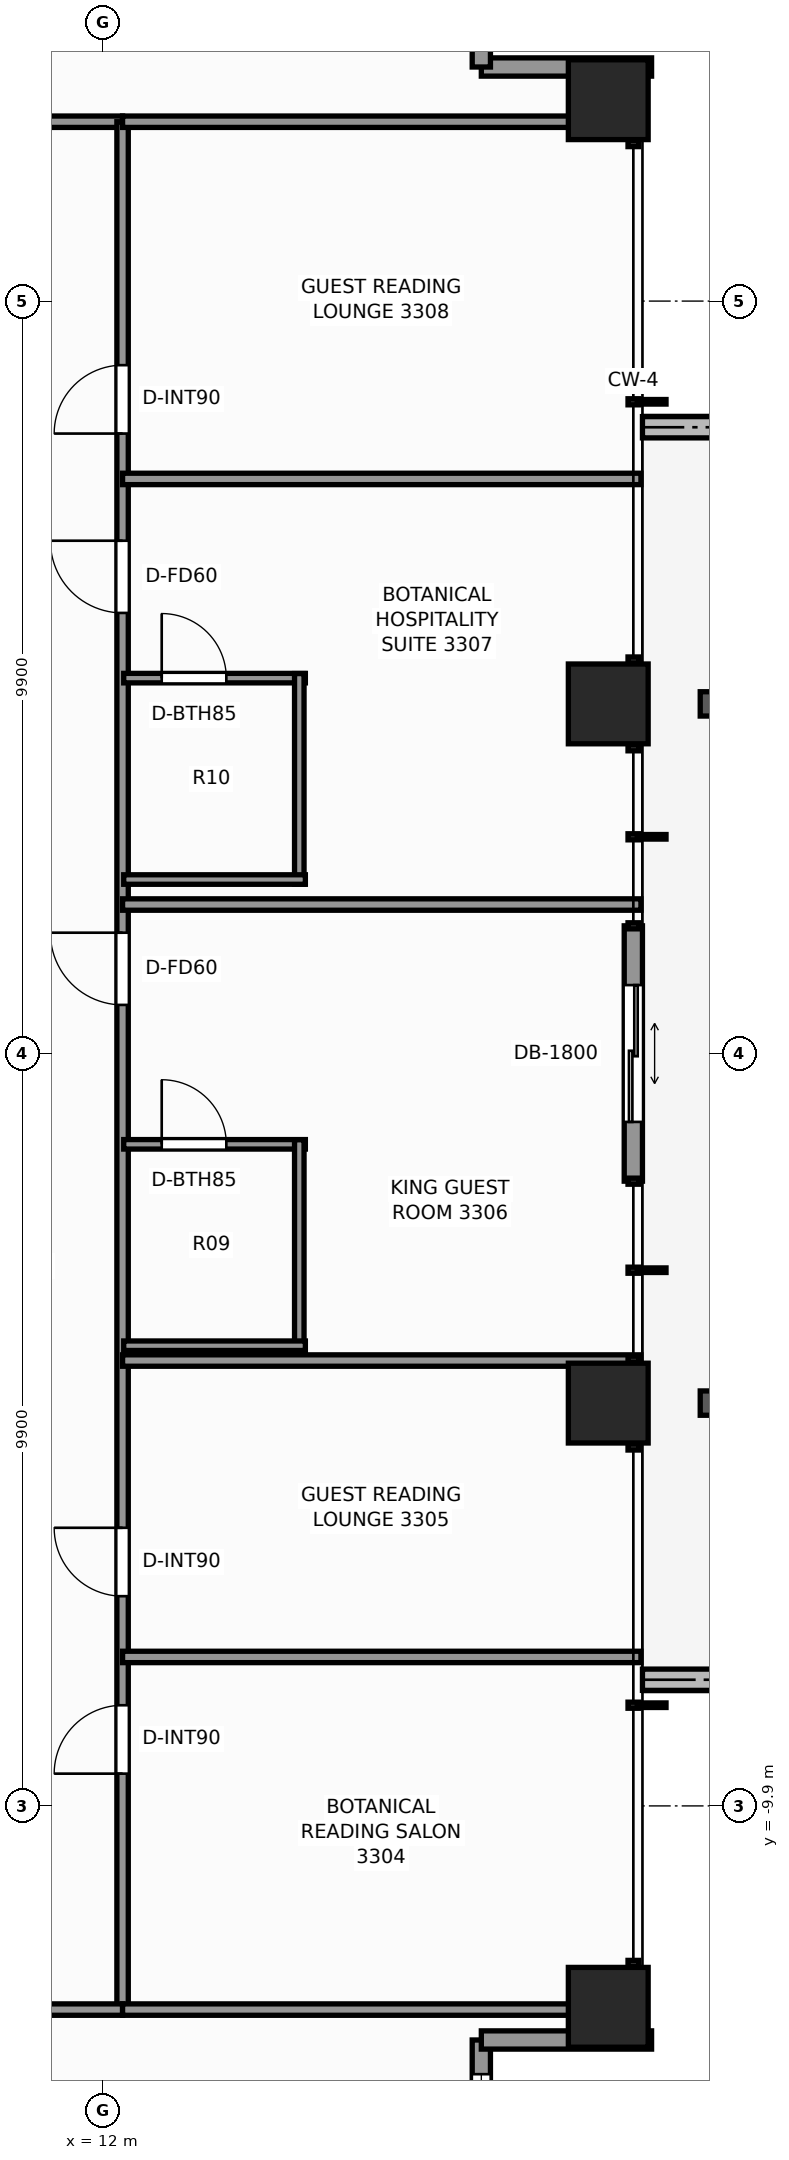
"""IFC4 building model, lengths in metres.
Left out: names, types, materials, properties, quantities, classifications, styles, units other than length and angle.
Written with IfcOpenShell. Run it as: python <this file> out.ifc"""

import sys

from ifc_helpers import new_model, si_unit, direction, frame, frame_2d, origin, origin_2d, place, context, subcontext, project, spatial, rectangle, extrude, element, fill, save


model = new_model("IFC4")
c1 = context("Model", 3, precision=1e-05, world=origin(), true_north=direction((0.0, 1.0)))
c2 = subcontext(c1, "Body", "Model", "MODEL_VIEW")
j1 = project(units=[si_unit("LENGTHUNIT", "METRE"), si_unit("PLANEANGLEUNIT", "RADIAN")], contexts=[c1])
p1 = place(None, origin())
s1 = spatial("IfcSite", under=j1, at=p1, CompositionType="ELEMENT")
p2 = place(p1, origin())
s2 = spatial("IfcBuilding", under=s1, at=p2, CompositionType="ELEMENT")
p3 = place(p2, frame((0.0, 0.0, 115.1)))
s3 = spatial("IfcBuildingStorey", under=s2, at=p3, CompositionType="ELEMENT", Elevation=115.1)
for number, where, z_axis, x_axis in (
    (1, (18.65, -12.55, 0.0), (0.0, 0.0, 1.0), (1.0, 0.0, 0.0)),
    (2, (18.65, -4.6, 0.0), (0.0, 0.0, 1.0), (1.0, 0.0, 0.0)),
    (3, (18.65, 4.6, 0.0), (0.0, 0.0, 1.0), (1.0, 0.0, 0.0)),
    (4, (18.65, 12.55, 0.0), (0.0, 0.0, 1.0), (1.0, 0.0, 0.0)),
):
    element("IfcColumn", number, at=place(p3, frame(where, z_axis=z_axis, x_axis=x_axis)), inside=s3, PredefinedType="COLUMN", context=c2, shape_type="SweptSolid", body=[
        extrude(rectangle(XDim=1.05, YDim=1.05, at=origin_2d()), origin(), (0.0, 0.0, 1.0), 3.3),
    ])
p4 = place(p3, frame((20.805, 8.24, -0.04), z_axis=(0.0, 0.0, 1.0), x_axis=(-1.0, 0.0, 0.0)))
e5 = element("IfcWall", 5, at=p4, inside=s3, PredefinedType="PARAPET", context=c2, shape_type="SweptSolid", body=[
    extrude(rectangle(XDim=1.705, YDim=0.28, at=frame_2d((0.853, 0.0))), origin(), (0.0, 0.0, 1.0), 0.42),
])
p5 = place(p3, frame((19.1, -8.24, -0.04), z_axis=(0.0, 0.0, 1.0), x_axis=(1.0, 0.0, 0.0)))
e6 = element("IfcWall", 6, at=p5, inside=s3, PredefinedType="PARAPET", context=c2, shape_type="SweptSolid", body=[
    extrude(rectangle(XDim=2.975, YDim=0.28, at=frame_2d((1.487, 0.0))), origin(), (0.0, 0.0, 1.0), 0.42),
])
p6 = place(p3, frame((16.98, -12.98, 0.0), z_axis=(0.0, 0.0, 1.0), x_axis=(0.0, -1.0, 0.0)))
e7 = element("IfcWall", 7, at=p6, inside=s3, PredefinedType="STANDARD", context=c2, shape_type="SweptSolid", body=[
    extrude(rectangle(XDim=2.24, YDim=0.24, at=frame_2d((1.12, 0.0))), origin(), (0.0, 0.0, 1.0), 2.459),
])
p7 = place(p6, frame((0.45, 0.0, 0.65)))
e8 = element("IfcOpeningElement", 8, at=p7, cuts=e7, PredefinedType="OPENING", context=c2, shape_type="SweptSolid", body=[
    extrude(rectangle(XDim=1.1, YDim=1.45, at=frame_2d((0.55, 0.725))), frame((0.0, 0.13, 0.0), z_axis=(0.0, -1.0, 0.0), x_axis=(1.0, 0.0, 0.0)), (0.0, 0.0, 1.0), 0.26),
])
p8 = place(p3, frame((19.22, -12.98, 0.0), z_axis=(0.0, 0.0, 1.0), x_axis=(-1.0, 0.0, 0.0)))
e9 = element("IfcWall", 9, at=p8, inside=s3, PredefinedType="STANDARD", context=c2, shape_type="SweptSolid", body=[
    extrude(rectangle(XDim=2.24, YDim=0.24, at=frame_2d((1.12, 0.0))), origin(), (0.0, 0.0, 1.0), 2.459),
])
p9 = place(p3, frame((18.98, 1.68, 0.0), z_axis=(0.0, 0.0, 1.0), x_axis=(0.0, -1.0, 0.0)))
e10 = element("IfcWall", 10, at=p9, inside=s3, PredefinedType="STANDARD", context=c2, shape_type="SweptSolid", body=[
    extrude(rectangle(XDim=3.36, YDim=0.24, at=frame_2d((1.68, 0.0))), origin(), (0.0, 0.0, 1.0), 3.08),
])
p10 = place(p9, frame((0.78, 0.0, 0.0)))
e11 = element("IfcOpeningElement", 11, at=p10, cuts=e10, PredefinedType="OPENING", context=c2, shape_type="SweptSolid", body=[
    extrude(rectangle(XDim=1.8, YDim=2.2, at=frame_2d((0.9, 1.1))), frame((0.0, 0.13, 0.0), z_axis=(0.0, -1.0, 0.0), x_axis=(1.0, 0.0, 0.0)), (0.0, 0.0, 1.0), 0.26),
])
p11 = place(p3, frame((16.98, 12.98, 0.0), z_axis=(0.0, 0.0, 1.0), x_axis=(1.0, 0.0, 0.0)))
e12 = element("IfcWall", 12, at=p11, inside=s3, PredefinedType="STANDARD", context=c2, shape_type="SweptSolid", body=[
    extrude(rectangle(XDim=2.24, YDim=0.24, at=frame_2d((1.12, 0.0))), origin(), (0.0, 0.0, 1.0), 2.459),
])
p12 = place(p3, frame((16.98, 15.22, 0.0), z_axis=(0.0, 0.0, 1.0), x_axis=(0.0, -1.0, 0.0)))
e13 = element("IfcWall", 13, at=p12, inside=s3, PredefinedType="STANDARD", context=c2, shape_type="SweptSolid", body=[
    extrude(rectangle(XDim=2.24, YDim=0.24, at=frame_2d((1.12, 0.0))), origin(), (0.0, 0.0, 1.0), 2.459),
])
p13 = place(p12, frame((0.45, 0.0, 0.65)))
e14 = element("IfcOpeningElement", 14, at=p13, cuts=e13, PredefinedType="OPENING", context=c2, shape_type="SweptSolid", body=[
    extrude(rectangle(XDim=1.1, YDim=1.45, at=frame_2d((0.55, 0.725))), frame((0.0, 0.13, 0.0), z_axis=(0.0, -1.0, 0.0), x_axis=(1.0, 0.0, 0.0)), (0.0, 0.0, 1.0), 0.26),
])
p14 = place(p3, frame((-12.42, 12.26, 0.0), z_axis=(0.0, 0.0, 1.0), x_axis=(1.0, 0.0, 0.0)))
e15 = element("IfcWall", 15, at=p14, inside=s3, PredefinedType="PARTITIONING", context=c2, shape_type="SweptSolid", body=[
    extrude(rectangle(XDim=24.68, YDim=0.15, at=frame_2d((12.34, 0.0))), origin(), (0.0, 0.0, 1.0), 2.292),
])
p15 = place(p14, frame((4.435, 0.0, 0.0)))
e16 = element("IfcOpeningElement", 16, at=p15, cuts=e15, PredefinedType="OPENING", context=c2, shape_type="SweptSolid", body=[
    extrude(rectangle(XDim=0.9, YDim=2.06, at=frame_2d((0.45, 1.03))), frame((0.0, 0.085, 0.0), z_axis=(0.0, -1.0, 0.0), x_axis=(1.0, 0.0, 0.0)), (0.0, 0.0, 1.0), 0.17),
])
p16 = place(p14, frame((9.718, 0.0, 0.0)))
e17 = element("IfcOpeningElement", 17, at=p16, cuts=e15, PredefinedType="OPENING", context=c2, shape_type="SweptSolid", body=[
    extrude(rectangle(XDim=0.9, YDim=2.06, at=frame_2d((0.45, 1.03))), frame((0.0, 0.085, 0.0), z_axis=(0.0, -1.0, 0.0), x_axis=(1.0, 0.0, 0.0)), (0.0, 0.0, 1.0), 0.17),
])
p17 = place(p14, frame((13.516, 0.0, 0.0)))
e18 = element("IfcOpeningElement", 18, at=p17, cuts=e15, PredefinedType="OPENING", context=c2, shape_type="SweptSolid", body=[
    extrude(rectangle(XDim=0.95, YDim=2.06, at=frame_2d((0.475, 1.03))), frame((0.0, 0.085, 0.0), z_axis=(0.0, -1.0, 0.0), x_axis=(1.0, 0.0, 0.0)), (0.0, 0.0, 1.0), 0.17),
])
p18 = place(p14, frame((18.772, 0.0, 0.0)))
e19 = element("IfcOpeningElement", 19, at=p18, cuts=e15, PredefinedType="OPENING", context=c2, shape_type="SweptSolid", body=[
    extrude(rectangle(XDim=0.9, YDim=2.06, at=frame_2d((0.45, 1.03))), frame((0.0, 0.085, 0.0), z_axis=(0.0, -1.0, 0.0), x_axis=(1.0, 0.0, 0.0)), (0.0, 0.0, 1.0), 0.17),
])
p19 = place(p14, frame((21.107, 0.0, 0.0)))
e20 = element("IfcOpeningElement", 20, at=p19, cuts=e15, PredefinedType="OPENING", context=c2, shape_type="SweptSolid", body=[
    extrude(rectangle(XDim=0.9, YDim=2.06, at=frame_2d((0.45, 1.03))), frame((0.0, 0.085, 0.0), z_axis=(0.0, -1.0, 0.0), x_axis=(1.0, 0.0, 0.0)), (0.0, 0.0, 1.0), 0.17),
])
p20 = place(p3, frame((12.26, -12.58, 0.0), z_axis=(0.0, 0.0, 1.0), x_axis=(0.0, 1.0, 0.0)))
e21 = element("IfcWall", 21, at=p20, inside=s3, PredefinedType="PARTITIONING", context=c2, shape_type="SweptSolid", body=[
    extrude(rectangle(XDim=24.84, YDim=0.15, at=frame_2d((12.42, 0.0))), origin(), (0.0, 0.0, 1.0), 2.292),
])
p21 = place(p20, frame((3.104, 0.0, 0.0)))
e22 = element("IfcOpeningElement", 22, at=p21, cuts=e21, PredefinedType="OPENING", context=c2, shape_type="SweptSolid", body=[
    extrude(rectangle(XDim=0.9, YDim=2.06, at=frame_2d((0.45, 1.03))), frame((0.0, 0.085, 0.0), z_axis=(0.0, -1.0, 0.0), x_axis=(1.0, 0.0, 0.0)), (0.0, 0.0, 1.0), 0.17),
])
p22 = place(p20, frame((5.439, 0.0, 0.0)))
e23 = element("IfcOpeningElement", 23, at=p22, cuts=e21, PredefinedType="OPENING", context=c2, shape_type="SweptSolid", body=[
    extrude(rectangle(XDim=0.9, YDim=2.06, at=frame_2d((0.45, 1.03))), frame((0.0, 0.085, 0.0), z_axis=(0.0, -1.0, 0.0), x_axis=(1.0, 0.0, 0.0)), (0.0, 0.0, 1.0), 0.17),
])
p23 = place(p20, frame((13.219, 0.0, 0.0)))
e24 = element("IfcOpeningElement", 24, at=p23, cuts=e21, PredefinedType="OPENING", context=c2, shape_type="SweptSolid", body=[
    extrude(rectangle(XDim=0.95, YDim=2.06, at=frame_2d((0.475, 1.03))), frame((0.0, 0.085, 0.0), z_axis=(0.0, -1.0, 0.0), x_axis=(1.0, 0.0, 0.0)), (0.0, 0.0, 1.0), 0.17),
])
p24 = place(p20, frame((18.377, 0.0, 0.0)))
e25 = element("IfcOpeningElement", 25, at=p24, cuts=e21, PredefinedType="OPENING", context=c2, shape_type="SweptSolid", body=[
    extrude(rectangle(XDim=0.95, YDim=2.06, at=frame_2d((0.475, 1.03))), frame((0.0, 0.085, 0.0), z_axis=(0.0, -1.0, 0.0), x_axis=(1.0, 0.0, 0.0)), (0.0, 0.0, 1.0), 0.17),
])
p25 = place(p20, frame((20.737, 0.0, 0.0)))
e26 = element("IfcOpeningElement", 26, at=p25, cuts=e21, PredefinedType="OPENING", context=c2, shape_type="SweptSolid", body=[
    extrude(rectangle(XDim=0.9, YDim=2.06, at=frame_2d((0.45, 1.03))), frame((0.0, 0.085, 0.0), z_axis=(0.0, -1.0, 0.0), x_axis=(1.0, 0.0, 0.0)), (0.0, 0.0, 1.0), 0.17),
])
p26 = place(p3, frame((-3.65, -12.58, 0.0), z_axis=(0.0, 0.0, 1.0), x_axis=(1.0, 0.0, 0.0)))
e27 = element("IfcWall", 27, at=p26, inside=s3, PredefinedType="PARTITIONING", context=c2, shape_type="SweptSolid", body=[
    extrude(rectangle(XDim=15.91, YDim=0.15, at=frame_2d((7.955, 0.0))), origin(), (0.0, 0.0, 1.0), 2.292),
])
p27 = place(p26, frame((5.109, 0.0, 0.0)))
e28 = element("IfcOpeningElement", 28, at=p27, cuts=e27, PredefinedType="OPENING", context=c2, shape_type="SweptSolid", body=[
    extrude(rectangle(XDim=0.95, YDim=2.06, at=frame_2d((0.475, 1.03))), frame((0.0, 0.085, 0.0), z_axis=(0.0, -1.0, 0.0), x_axis=(1.0, 0.0, 0.0)), (0.0, 0.0, 1.0), 0.17),
])
p28 = place(p26, frame((9.858, 0.0, 0.0)))
e29 = element("IfcOpeningElement", 29, at=p28, cuts=e27, PredefinedType="OPENING", context=c2, shape_type="SweptSolid", body=[
    extrude(rectangle(XDim=0.9, YDim=2.06, at=frame_2d((0.45, 1.03))), frame((0.0, 0.085, 0.0), z_axis=(0.0, -1.0, 0.0), x_axis=(1.0, 0.0, 0.0)), (0.0, 0.0, 1.0), 0.17),
])
p29 = place(p26, frame((12.028, 0.0, 0.0)))
e30 = element("IfcOpeningElement", 30, at=p29, cuts=e27, PredefinedType="OPENING", context=c2, shape_type="SweptSolid", body=[
    extrude(rectangle(XDim=0.9, YDim=2.06, at=frame_2d((0.45, 1.03))), frame((0.0, 0.085, 0.0), z_axis=(0.0, -1.0, 0.0), x_axis=(1.0, 0.0, 0.0)), (0.0, 0.0, 1.0), 0.17),
])
for number, where, z_axis, x_axis in (
    (31, (12.26, -12.58, 0.0), (0.0, 0.0, 1.0), (1.0, 0.0, 0.0)),
    (32, (12.26, 12.26, 0.0), (0.0, 0.0, 1.0), (1.0, 0.0, 0.0)),
):
    element("IfcWall", number, at=place(p3, frame(where, z_axis=z_axis, x_axis=x_axis)), inside=s3, PredefinedType="PARTITIONING", context=c2, shape_type="SweptSolid", body=[
        extrude(rectangle(XDim=6.82, YDim=0.15, at=frame_2d((3.41, 0.0))), origin(), (0.0, 0.0, 1.0), 2.292),
    ])
for number, where, z_axis, x_axis in (
    (33, (12.26, -7.94, 0.0), (0.0, 0.0, 1.0), (1.0, 0.0, 0.0)),
    (34, (12.26, -4.04, 0.0), (0.0, 0.0, 1.0), (1.0, 0.0, 0.0)),
    (35, (12.26, 1.96, 0.0), (0.0, 0.0, 1.0), (1.0, 0.0, 0.0)),
):
    element("IfcWall", number, at=place(p3, frame(where, z_axis=z_axis, x_axis=x_axis)), inside=s3, PredefinedType="PARTITIONING", context=c2, shape_type="SweptSolid", body=[
        extrude(rectangle(XDim=6.82, YDim=0.15, at=frame_2d((3.41, 0.0))), origin(), (0.0, 0.0, 1.0), 2.449),
    ])
p30 = place(p3, frame((12.275, -1.195, 0.0), z_axis=(0.0, 0.0, 1.0), x_axis=(1.0, 0.0, 0.0)))
e36 = element("IfcWall", 36, at=p30, inside=s3, PredefinedType="PARTITIONING", context=c2, shape_type="SweptSolid", body=[
    extrude(rectangle(XDim=2.39, YDim=0.125, at=frame_2d((1.195, 0.0))), origin(), (0.0, 0.0, 1.0), 3.08),
])
p31 = place(p30, frame((0.5, 0.0, 0.0)))
e37 = element("IfcOpeningElement", 37, at=p31, cuts=e36, PredefinedType="OPENING", context=c2, shape_type="SweptSolid", body=[
    extrude(rectangle(XDim=0.85, YDim=2.03, at=frame_2d((0.425, 1.015))), frame((0.0, 0.073, 0.0), z_axis=(0.0, -1.0, 0.0), x_axis=(1.0, 0.0, 0.0)), (0.0, 0.0, 1.0), 0.145),
])
p32 = place(p3, frame((14.585, -3.905, 0.0), z_axis=(0.0, 0.0, 1.0), x_axis=(0.0, 1.0, 0.0)))
e38 = element("IfcWall", 38, at=p32, inside=s3, PredefinedType="PARTITIONING", context=c2, shape_type="SweptSolid", body=[
    extrude(rectangle(XDim=2.77, YDim=0.125, at=frame_2d((1.385, 0.0))), origin(), (0.0, 0.0, 1.0), 3.08),
])
p33 = place(p3, frame((12.275, -3.845, 0.0), z_axis=(0.0, 0.0, 1.0), x_axis=(1.0, 0.0, 0.0)))
e39 = element("IfcWall", 39, at=p33, inside=s3, PredefinedType="PARTITIONING", context=c2, shape_type="SweptSolid", body=[
    extrude(rectangle(XDim=2.39, YDim=0.125, at=frame_2d((1.195, 0.0))), origin(), (0.0, 0.0, 1.0), 3.08),
])
p34 = place(p3, frame((12.26, 7.56, 0.0), z_axis=(0.0, 0.0, 1.0), x_axis=(1.0, 0.0, 0.0)))
e40 = element("IfcWall", 40, at=p34, inside=s3, PredefinedType="PARTITIONING", context=c2, shape_type="SweptSolid", body=[
    extrude(rectangle(XDim=6.82, YDim=0.15, at=frame_2d((3.41, 0.0))), origin(), (0.0, 0.0, 1.0), 2.449),
])
p35 = place(p3, frame((12.275, 4.939, 0.0), z_axis=(0.0, 0.0, 1.0), x_axis=(1.0, 0.0, 0.0)))
e41 = element("IfcWall", 41, at=p35, inside=s3, PredefinedType="PARTITIONING", context=c2, shape_type="SweptSolid", body=[
    extrude(rectangle(XDim=2.39, YDim=0.125, at=frame_2d((1.195, 0.0))), origin(), (0.0, 0.0, 1.0), 3.08),
])
p36 = place(p35, frame((0.5, 0.0, 0.0)))
e42 = element("IfcOpeningElement", 42, at=p36, cuts=e41, PredefinedType="OPENING", context=c2, shape_type="SweptSolid", body=[
    extrude(rectangle(XDim=0.85, YDim=2.03, at=frame_2d((0.425, 1.015))), frame((0.0, 0.073, 0.0), z_axis=(0.0, -1.0, 0.0), x_axis=(1.0, 0.0, 0.0)), (0.0, 0.0, 1.0), 0.145),
])
p37 = place(p3, frame((14.585, 2.229, 0.0), z_axis=(0.0, 0.0, 1.0), x_axis=(0.0, 1.0, 0.0)))
e43 = element("IfcWall", 43, at=p37, inside=s3, PredefinedType="PARTITIONING", context=c2, shape_type="SweptSolid", body=[
    extrude(rectangle(XDim=2.77, YDim=0.125, at=frame_2d((1.385, 0.0))), origin(), (0.0, 0.0, 1.0), 2.292),
])
p38 = place(p3, frame((12.275, 2.289, 0.0), z_axis=(0.0, 0.0, 1.0), x_axis=(1.0, 0.0, 0.0)))
e44 = element("IfcWall", 44, at=p38, inside=s3, PredefinedType="PARTITIONING", context=c2, shape_type="SweptSolid", body=[
    extrude(rectangle(XDim=2.39, YDim=0.125, at=frame_2d((1.195, 0.0))), origin(), (0.0, 0.0, 1.0), 3.08),
])
p39 = place(p7, origin())
e45 = element("IfcWindow", 45, at=p39, inside=s3, PartitioningType="SINGLE_PANEL", PredefinedType="WINDOW", context=c2, shape_type="SweptSolid", body=[
    extrude(rectangle(XDim=1.1, YDim=1.45, at=frame_2d((0.55, 0.725))), frame((0.0, 0.03, 0.0), z_axis=(0.0, -1.0, 0.0), x_axis=(1.0, 0.0, 0.0)), (0.0, 0.0, 1.0), 0.06),
])
fill(e8, e45)
p40 = place(p10, origin())
e46 = element("IfcDoor", 46, at=p40, inside=s3, OperationType="DOUBLE_DOOR_SLIDING", PredefinedType="DOOR", context=c2, shape_type="SweptSolid", body=[
    extrude(rectangle(XDim=1.8, YDim=2.2, at=frame_2d((0.9, 1.1))), frame((0.0, 0.025, 0.0), z_axis=(0.0, -1.0, 0.0), x_axis=(1.0, 0.0, 0.0)), (0.0, 0.0, 1.0), 0.05),
])
fill(e11, e46)
p41 = place(p21, origin())
e47 = element("IfcDoor", 47, at=p41, inside=s3, OperationType="SINGLE_SWING_LEFT", PredefinedType="DOOR", context=c2, shape_type="SweptSolid", body=[
    extrude(rectangle(XDim=0.9, YDim=2.06, at=frame_2d((0.45, 1.03))), frame((0.0, 0.025, 0.0), z_axis=(0.0, -1.0, 0.0), x_axis=(1.0, 0.0, 0.0)), (0.0, 0.0, 1.0), 0.05),
])
fill(e22, e47)
p42 = place(p22, origin())
e48 = element("IfcDoor", 48, at=p42, inside=s3, OperationType="SINGLE_SWING_RIGHT", PredefinedType="DOOR", context=c2, shape_type="SweptSolid", body=[
    extrude(rectangle(XDim=0.9, YDim=2.06, at=frame_2d((0.45, 1.03))), frame((0.0, 0.025, 0.0), z_axis=(0.0, -1.0, 0.0), x_axis=(1.0, 0.0, 0.0)), (0.0, 0.0, 1.0), 0.05),
])
fill(e23, e48)
p43 = place(p31, origin())
e49 = element("IfcDoor", 49, at=p43, inside=s3, OperationType="SINGLE_SWING_LEFT", PredefinedType="DOOR", context=c2, shape_type="SweptSolid", body=[
    extrude(rectangle(XDim=0.85, YDim=2.03, at=frame_2d((0.425, 1.015))), frame((0.0, 0.025, 0.0), z_axis=(0.0, -1.0, 0.0), x_axis=(1.0, 0.0, 0.0)), (0.0, 0.0, 1.0), 0.05),
])
fill(e37, e49)
p44 = place(p23, origin())
e50 = element("IfcDoor", 50, at=p44, inside=s3, OperationType="SINGLE_SWING_RIGHT", PredefinedType="DOOR", context=c2, shape_type="SweptSolid", body=[
    extrude(rectangle(XDim=0.95, YDim=2.06, at=frame_2d((0.475, 1.03))), frame((0.0, 0.025, 0.0), z_axis=(0.0, -1.0, 0.0), x_axis=(1.0, 0.0, 0.0)), (0.0, 0.0, 1.0), 0.05),
])
fill(e24, e50)
p45 = place(p36, origin())
e51 = element("IfcDoor", 51, at=p45, inside=s3, OperationType="SINGLE_SWING_LEFT", PredefinedType="DOOR", context=c2, shape_type="SweptSolid", body=[
    extrude(rectangle(XDim=0.85, YDim=2.03, at=frame_2d((0.425, 1.015))), frame((0.0, 0.025, 0.0), z_axis=(0.0, -1.0, 0.0), x_axis=(1.0, 0.0, 0.0)), (0.0, 0.0, 1.0), 0.05),
])
fill(e42, e51)
p46 = place(p24, origin())
e52 = element("IfcDoor", 52, at=p46, inside=s3, OperationType="SINGLE_SWING_RIGHT", PredefinedType="DOOR", context=c2, shape_type="SweptSolid", body=[
    extrude(rectangle(XDim=0.95, YDim=2.06, at=frame_2d((0.475, 1.03))), frame((0.0, 0.025, 0.0), z_axis=(0.0, -1.0, 0.0), x_axis=(1.0, 0.0, 0.0)), (0.0, 0.0, 1.0), 0.05),
])
fill(e25, e52)
p47 = place(p25, origin())
e53 = element("IfcDoor", 53, at=p47, inside=s3, OperationType="SINGLE_SWING_LEFT", PredefinedType="DOOR", context=c2, shape_type="SweptSolid", body=[
    extrude(rectangle(XDim=0.9, YDim=2.06, at=frame_2d((0.45, 1.03))), frame((0.0, 0.025, 0.0), z_axis=(0.0, -1.0, 0.0), x_axis=(1.0, 0.0, 0.0)), (0.0, 0.0, 1.0), 0.05),
])
fill(e26, e53)
save(model, sys.argv[1])
